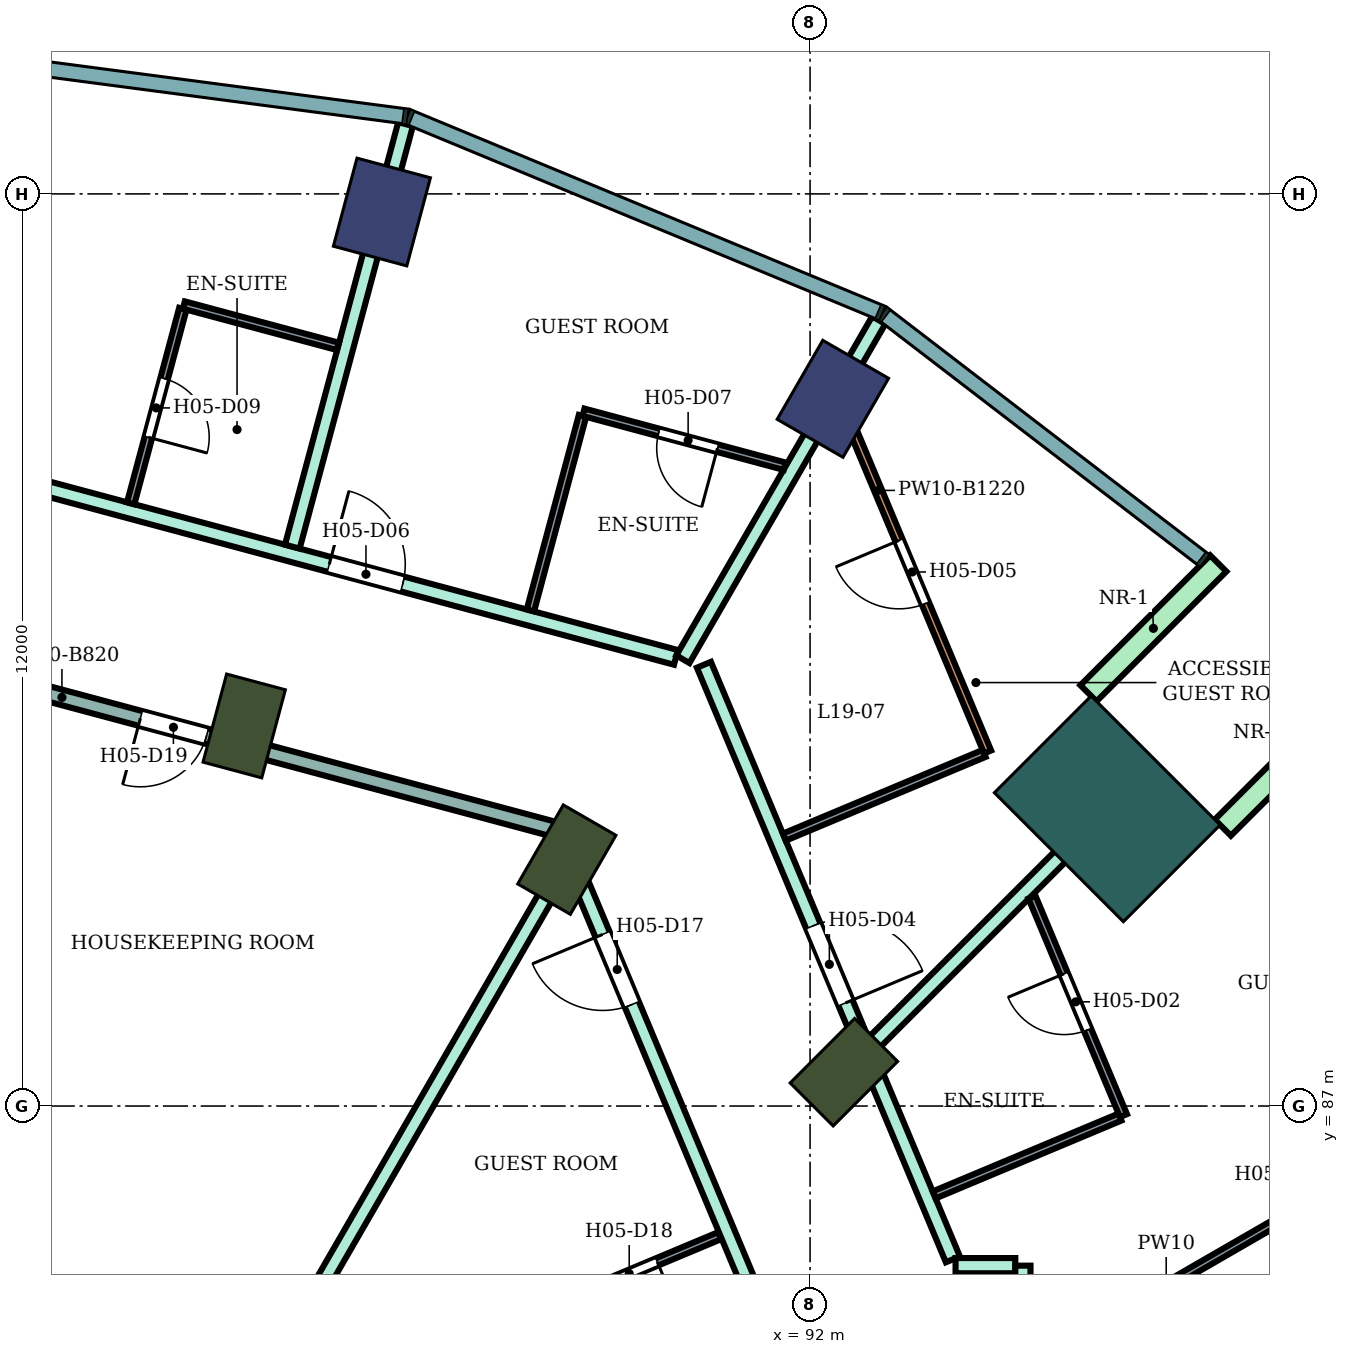
"""IFC4 building model, lengths in metres.
Left out: names, types, materials, properties, quantities, classifications, styles, units other than length and angle.
Written with IfcOpenShell. Run it as: python <this file> out.ifc"""

import sys

from ifc_helpers import new_model, si_unit, direction, frame, frame_2d, origin, origin_2d, place, context, subcontext, project, spatial, rectangle, extrude, element, fill, save


model = new_model("IFC4")
c1 = context("Model", 3, precision=1e-05, world=origin(), true_north=direction((0.0, 1.0)))
c2 = subcontext(c1, "Body", "Model", "MODEL_VIEW")
j1 = project(units=[si_unit("LENGTHUNIT", "METRE"), si_unit("PLANEANGLEUNIT", "RADIAN")], contexts=[c1])
p1 = place(None, origin())
s1 = spatial("IfcSite", under=j1, at=p1, CompositionType="ELEMENT")
p2 = place(p1, origin())
s2 = spatial("IfcBuilding", under=s1, at=p2, CompositionType="ELEMENT")
p3 = place(p2, frame((0.0, 0.0, 86.2)))
s3 = spatial("IfcBuildingStorey", under=s2, at=p3, CompositionType="ELEMENT", Elevation=86.2)
for number, where, z_axis, x_axis in (
    (1, (92.3, 96.304, 0.0), (0.0, 0.0, 1.0), (0.5, 0.866, 0.0)),
    (2, (86.367, 98.762, 0.0), (0.0, 0.0, 1.0), (0.259, 0.966, 0.0)),
):
    element("IfcColumn", number, at=place(p3, frame(where, z_axis=z_axis, x_axis=x_axis)), inside=s3, PredefinedType="COLUMN", context=c2, shape_type="SweptSolid", body=[
        extrude(rectangle(XDim=1.2, YDim=1.0, at=origin_2d()), origin(), (0.0, 0.0, 1.0), 3.8),
    ])
for number, where, z_axis, x_axis in (
    (3, (92.445, 87.445, 0.0), (0.0, 0.0, 1.0), (0.707, 0.707, 0.0)),
    (4, (88.8, 90.242, 0.0), (0.0, 0.0, 1.0), (0.5, 0.866, 0.0)),
    (5, (84.555, 92.0, 0.0), (0.0, 0.0, 1.0), (0.259, 0.966, 0.0)),
):
    element("IfcColumn", number, at=place(p3, frame(where, z_axis=z_axis, x_axis=x_axis)), inside=s3, PredefinedType="COLUMN", context=c2, shape_type="SweptSolid", body=[
        extrude(rectangle(XDim=1.2, YDim=0.8, at=origin_2d()), origin(), (0.0, 0.0, 1.0), 3.8),
    ])
p4 = place(p3, frame((95.91, 90.91, 0.0), z_axis=(0.0, 0.0, 1.0), x_axis=(0.707106781187, 0.707106781187, 0.0)))
e6 = element("IfcColumn", 6, at=p4, inside=s3, PredefinedType="COLUMN", context=c2, shape_type="SweptSolid", body=[
    extrude(rectangle(XDim=1.8, YDim=2.4, at=origin_2d()), origin(), (0.0, 0.0, 1.0), 3.8),
])
for number, where, z_axis, x_axis in (
    (7, (97.43, 90.662, 0.0), (0.0, 0.0, 1.0), (0.707, 0.707, 0.0)),
    (8, (95.662, 92.43, 0.0), (0.0, 0.0, 1.0), (0.707, 0.707, 0.0)),
):
    element("IfcWall", number, at=place(p3, frame(where, z_axis=z_axis, x_axis=x_axis)), inside=s3, PredefinedType="NOTDEFINED", context=c2, shape_type="SweptSolid", body=[
        extrude(rectangle(XDim=2.416, YDim=0.3, at=frame_2d((1.208, 0.0))), origin(), (0.0, 0.0, 1.0), 3.8),
    ])
p5 = place(p3, frame((80.0, 92.954, 0.0), z_axis=(0.0, 0.0, 1.0), x_axis=(0.965932194462, -0.258795277586, 0.0)))
e9 = element("IfcWall", 9, at=p5, inside=s3, PredefinedType="PARTITIONING", context=c2, shape_type="SweptSolid", body=[
    extrude(rectangle(XDim=8.934, YDim=0.2, at=frame_2d((4.467, 0.0))), origin(), (0.0, 0.0, 1.0), 2.98),
])
p6 = place(p5, frame((3.302, 0.0, 0.0)))
e10 = element("IfcOpeningElement", 10, at=p6, cuts=e9, PredefinedType="OPENING", context=c2, shape_type="SweptSolid", body=[
    extrude(rectangle(XDim=0.9, YDim=2.1, at=frame_2d((0.45, 1.05))), frame((0.0, 0.11, 0.0), z_axis=(0.0, -1.0, 0.0), x_axis=(1.0, 0.0, 0.0)), (0.0, 0.0, 1.0), 0.22),
])
p7 = place(p3, frame((80.0, 95.648, 0.0), z_axis=(0.0, 0.0, 1.0), x_axis=(0.965852259202, -0.259093445292, 0.0)))
e11 = element("IfcWall", 11, at=p7, inside=s3, PredefinedType="PARTITIONING", context=c2, shape_type="SweptSolid", body=[
    extrude(rectangle(XDim=10.597, YDim=0.2, at=frame_2d((5.298, 0.0))), origin(), (0.0, 0.0, 1.0), 3.35),
])
p8 = place(p7, frame((5.875, 0.0, 0.0)))
e12 = element("IfcOpeningElement", 12, at=p8, cuts=e11, PredefinedType="OPENING", context=c2, shape_type="SweptSolid", body=[
    extrude(rectangle(XDim=1.0, YDim=2.1, at=frame_2d((0.5, 1.05))), frame((0.0, 0.11, 0.0), z_axis=(0.0, -1.0, 0.0), x_axis=(1.0, 0.0, 0.0)), (0.0, 0.0, 1.0), 0.22),
])
p9 = place(p3, frame((83.85, 81.667, 0.0), z_axis=(0.0, 0.0, 1.0), x_axis=(0.500222212082, 0.865897071562, 0.0)))
e13 = element("IfcWall", 13, at=p9, inside=s3, PredefinedType="PARTITIONING", context=c2, shape_type="SweptSolid", body=[
    extrude(rectangle(XDim=9.768, YDim=0.2, at=frame_2d((4.884, 0.0))), origin(), (0.0, 0.0, 1.0), 3.35),
])
p10 = place(p3, frame((85.188, 94.36, 0.0), z_axis=(0.0, 0.0, 1.0), x_axis=(0.258882407816, 0.965908846074, 0.0)))
e14 = element("IfcWall", 14, at=p10, inside=s3, PredefinedType="PARTITIONING", context=c2, shape_type="SweptSolid", body=[
    extrude(rectangle(XDim=5.755, YDim=0.2, at=frame_2d((2.877, 0.0))), origin(), (0.0, 0.0, 1.0), 3.35),
])
p11 = place(p3, frame((88.698, 90.624, 0.0), z_axis=(0.0, 0.0, 1.0), x_axis=(0.386027055918, -0.922487459047, 0.0)))
e15 = element("IfcWall", 15, at=p11, inside=s3, PredefinedType="PARTITIONING", context=c2, shape_type="SweptSolid", body=[
    extrude(rectangle(XDim=7.832, YDim=0.2, at=frame_2d((3.916, 0.0))), origin(), (0.0, 0.0, 1.0), 3.35),
])
p12 = place(p11, frame((1.482, 0.0, 0.0)))
e16 = element("IfcOpeningElement", 16, at=p12, cuts=e15, PredefinedType="OPENING", context=c2, shape_type="SweptSolid", body=[
    extrude(rectangle(XDim=1.0, YDim=2.1, at=frame_2d((0.5, 1.05))), frame((0.0, 0.11, 0.0), z_axis=(0.0, -1.0, 0.0), x_axis=(1.0, 0.0, 0.0)), (0.0, 0.0, 1.0), 0.22),
])
p13 = place(p3, frame((90.327, 92.878, 0.0), z_axis=(0.0, 0.0, 1.0), x_axis=(0.50022153717, 0.865897461453, 0.0)))
e17 = element("IfcWall", 17, at=p13, inside=s3, PredefinedType="PARTITIONING", context=c2, shape_type="SweptSolid", body=[
    extrude(rectangle(XDim=5.152, YDim=0.2, at=frame_2d((2.576, 0.0))), origin(), (0.0, 0.0, 1.0), 3.35),
])
p14 = place(p3, frame((90.604, 92.805, 0.0), z_axis=(0.0, 0.0, 1.0), x_axis=(0.386209298583, -0.922411176042, 0.0)))
e18 = element("IfcWall", 18, at=p14, inside=s3, PredefinedType="PARTITIONING", context=c2, shape_type="SweptSolid", body=[
    extrude(rectangle(XDim=8.48, YDim=0.2, at=frame_2d((4.24, 0.0))), origin(), (0.0, 0.0, 1.0), 3.35),
])
p15 = place(p14, frame((3.723, 0.0, 0.0)))
e19 = element("IfcOpeningElement", 19, at=p15, cuts=e18, PredefinedType="OPENING", context=c2, shape_type="SweptSolid", body=[
    extrude(rectangle(XDim=1.1, YDim=2.1, at=frame_2d((0.55, 1.05))), frame((0.0, 0.11, 0.0), z_axis=(0.0, -1.0, 0.0), x_axis=(1.0, 0.0, 0.0)), (0.0, 0.0, 1.0), 0.22),
])
p16 = place(p3, frame((92.832, 87.824, 0.0), z_axis=(0.0, 0.0, 1.0), x_axis=(0.707251566381, 0.70696196634, 0.0)))
e20 = element("IfcWall", 20, at=p16, inside=s3, PredefinedType="PARTITIONING", context=c2, shape_type="SweptSolid", body=[
    extrude(rectangle(XDim=5.058, YDim=0.2, at=frame_2d((2.529, 0.0))), origin(), (0.0, 0.0, 1.0), 3.35),
])
p17 = place(p3, frame((93.914, 84.9, 0.0), z_axis=(0.0, 0.0, 1.0), x_axis=(1.0, 0.0, 0.0)))
e21 = element("IfcWall", 21, at=p17, inside=s3, PredefinedType="PARTITIONING", context=c2, shape_type="SweptSolid", body=[
    extrude(rectangle(XDim=0.786, YDim=0.2, at=frame_2d((0.393, 0.0))), origin(), (0.0, 0.0, 1.0), 3.35),
])
p18 = place(p3, frame((94.8, 83.65, 0.0), z_axis=(0.0, 0.0, 1.0), x_axis=(0.0, 1.0, 0.0)))
e22 = element("IfcWall", 22, at=p18, inside=s3, PredefinedType="PARTITIONING", context=c2, shape_type="SweptSolid", body=[
    extrude(rectangle(XDim=1.25, YDim=0.2, at=frame_2d((0.625, 0.0))), origin(), (0.0, 0.0, 1.0), 3.35),
])
p19 = place(p18, frame((0.062, 0.0, 0.0)))
e23 = element("IfcOpeningElement", 23, at=p19, cuts=e22, PredefinedType="OPENING", context=c2, shape_type="SweptSolid", body=[
    extrude(rectangle(XDim=1.0, YDim=2.1, at=frame_2d((0.5, 1.05))), frame((0.0, 0.11, 0.0), z_axis=(0.0, -1.0, 0.0), x_axis=(1.0, 0.0, 0.0)), (0.0, 0.0, 1.0), 0.22),
])
p20 = place(p3, frame((83.062, 94.929, 0.0), z_axis=(0.0, 0.0, 1.0), x_axis=(0.258889588814, 0.965906921398, 0.0)))
e24 = element("IfcWall", 24, at=p20, inside=s3, PredefinedType="PARTITIONING", context=c2, shape_type="SweptSolid", body=[
    extrude(rectangle(XDim=2.65, YDim=0.1, at=frame_2d((1.325, 0.0))), origin(), (0.0, 0.0, 1.0), 3.35),
])
p21 = place(p20, frame((0.9, 0.0, 0.0)))
e25 = element("IfcOpeningElement", 25, at=p21, cuts=e24, PredefinedType="OPENING", context=c2, shape_type="SweptSolid", body=[
    extrude(rectangle(XDim=0.8, YDim=2.1, at=frame_2d((0.4, 1.05))), frame((0.0, 0.06, 0.0), z_axis=(0.0, -1.0, 0.0), x_axis=(1.0, 0.0, 0.0)), (0.0, 0.0, 1.0), 0.12),
])
p22 = place(p3, frame((83.761, 97.538, 0.0), z_axis=(0.0, 0.0, 1.0), x_axis=(0.965871218513, -0.259022758166, 0.0)))
e26 = element("IfcWall", 26, at=p22, inside=s3, PredefinedType="PARTITIONING", context=c2, shape_type="SweptSolid", body=[
    extrude(rectangle(XDim=2.1, YDim=0.1, at=frame_2d((1.05, 0.0))), origin(), (0.0, 0.0, 1.0), 3.35),
])
p23 = place(p3, frame((88.321, 93.521, 0.0), z_axis=(0.0, 0.0, 1.0), x_axis=(0.258677737588, 0.965963678446, 0.0)))
e27 = element("IfcWall", 27, at=p23, inside=s3, PredefinedType="PARTITIONING", context=c2, shape_type="SweptSolid", body=[
    extrude(rectangle(XDim=2.649, YDim=0.1, at=frame_2d((1.325, 0.0))), origin(), (0.0, 0.0, 1.0), 3.35),
])
p24 = place(p3, frame((88.329, 84.255, 0.0), z_axis=(0.0, 0.0, 1.0), x_axis=(0.922320663728, 0.386425404522, 0.0)))
e28 = element("IfcWall", 28, at=p24, inside=s3, PredefinedType="PARTITIONING", context=c2, shape_type="SweptSolid", body=[
    extrude(rectangle(XDim=2.69, YDim=0.1, at=frame_2d((1.345, 0.0))), origin(), (0.0, 0.0, 1.0), 3.35),
])
p25 = place(p24, frame((1.0, 0.0, 0.0)))
e29 = element("IfcOpeningElement", 29, at=p25, cuts=e28, PredefinedType="OPENING", context=c2, shape_type="SweptSolid", body=[
    extrude(rectangle(XDim=0.8, YDim=2.1, at=frame_2d((0.4, 1.05))), frame((0.0, 0.06, 0.0), z_axis=(0.0, -1.0, 0.0), x_axis=(1.0, 0.0, 0.0)), (0.0, 0.0, 1.0), 0.12),
])
p26 = place(p3, frame((89.019, 96.127, 0.0), z_axis=(0.0, 0.0, 1.0), x_axis=(0.965839030583, -0.259142754101, 0.0)))
e30 = element("IfcWall", 30, at=p26, inside=s3, PredefinedType="PARTITIONING", context=c2, shape_type="SweptSolid", body=[
    extrude(rectangle(XDim=2.74, YDim=0.1, at=frame_2d((1.37, 0.0))), origin(), (0.0, 0.0, 1.0), 3.35),
])
p27 = place(p26, frame((1.026, 0.0, 0.0)))
e31 = element("IfcOpeningElement", 31, at=p27, cuts=e30, PredefinedType="OPENING", context=c2, shape_type="SweptSolid", body=[
    extrude(rectangle(XDim=0.8, YDim=2.1, at=frame_2d((0.4, 1.05))), frame((0.0, 0.06, 0.0), z_axis=(0.0, -1.0, 0.0), x_axis=(1.0, 0.0, 0.0)), (0.0, 0.0, 1.0), 0.12),
])
p28 = place(p3, frame((91.661, 90.538, 0.0), z_axis=(0.0, 0.0, 1.0), x_axis=(0.922352973625, 0.386348278169, 0.0)))
e32 = element("IfcWall", 32, at=p28, inside=s3, PredefinedType="PARTITIONING", context=c2, shape_type="SweptSolid", body=[
    extrude(rectangle(XDim=2.85, YDim=0.1, at=frame_2d((1.425, 0.0))), origin(), (0.0, 0.0, 1.0), 3.35),
])
p29 = place(p3, frame((92.414, 96.246, 0.0), z_axis=(0.0, 0.0, 1.0), x_axis=(0.386353683992, -0.922350709256, 0.0)))
e33 = element("IfcWall", 33, at=p29, inside=s3, PredefinedType="PARTITIONING", context=c2, shape_type="SweptSolid", body=[
    extrude(rectangle(XDim=4.974, YDim=0.1, at=frame_2d((2.487, 0.0))), origin(), (0.0, 0.0, 1.0), 2.58),
])
p30 = place(p29, frame((1.957, 0.0, 0.0)))
e34 = element("IfcOpeningElement", 34, at=p30, cuts=e33, PredefinedType="OPENING", context=c2, shape_type="SweptSolid", body=[
    extrude(rectangle(XDim=0.9, YDim=2.1, at=frame_2d((0.45, 1.05))), frame((0.0, 0.06, 0.0), z_axis=(0.0, -1.0, 0.0), x_axis=(1.0, 0.0, 0.0)), (0.0, 0.0, 1.0), 0.12),
])
p31 = place(p3, frame((93.633, 85.831, 0.0), z_axis=(0.0, 0.0, 1.0), x_axis=(0.922344808264, 0.38636777126, 0.0)))
e35 = element("IfcWall", 35, at=p31, inside=s3, PredefinedType="PARTITIONING", context=c2, shape_type="SweptSolid", body=[
    extrude(rectangle(XDim=2.65, YDim=0.1, at=frame_2d((1.325, 0.0))), origin(), (0.0, 0.0, 1.0), 3.35),
])
p32 = place(p3, frame((94.8, 83.545, 0.0), z_axis=(0.0, 0.0, 1.0), x_axis=(0.86602264145, 0.500004784474, 0.0)))
e36 = element("IfcWall", 36, at=p32, inside=s3, PredefinedType="PARTITIONING", context=c2, shape_type="SweptSolid", body=[
    extrude(rectangle(XDim=8.708, YDim=0.1, at=frame_2d((4.354, 0.0))), origin(), (0.0, 0.0, 1.0), 3.35),
])
p33 = place(p32, frame((3.879, 0.0, 0.0)))
e37 = element("IfcOpeningElement", 37, at=p33, cuts=e36, PredefinedType="OPENING", context=c2, shape_type="SweptSolid", body=[
    extrude(rectangle(XDim=0.9, YDim=2.1, at=frame_2d((0.45, 1.05))), frame((0.0, 0.06, 0.0), z_axis=(0.0, -1.0, 0.0), x_axis=(1.0, 0.0, 0.0)), (0.0, 0.0, 1.0), 0.12),
])
p34 = place(p3, frame((94.919, 89.748, 0.0), z_axis=(0.0, 0.0, 1.0), x_axis=(0.38635048828, -0.922352047868, 0.0)))
e38 = element("IfcWall", 38, at=p34, inside=s3, PredefinedType="PARTITIONING", context=c2, shape_type="SweptSolid", body=[
    extrude(rectangle(XDim=3.116, YDim=0.1, at=frame_2d((1.558, 0.0))), origin(), (0.0, 0.0, 1.0), 3.35),
])
p35 = place(p34, frame((1.093, 0.0, 0.0)))
e39 = element("IfcOpeningElement", 39, at=p35, cuts=e38, PredefinedType="OPENING", context=c2, shape_type="SweptSolid", body=[
    extrude(rectangle(XDim=0.8, YDim=2.1, at=frame_2d((0.4, 1.05))), frame((0.0, 0.06, 0.0), z_axis=(0.0, -1.0, 0.0), x_axis=(1.0, 0.0, 0.0)), (0.0, 0.0, 1.0), 0.12),
])
p36 = place(p35, frame((0.8, 0.0, 0.0), z_axis=(0.0, 0.0, 1.0), x_axis=(-1.0, 0.0, 0.0)))
e40 = element("IfcDoor", 40, at=p36, inside=s3, OperationType="SINGLE_SWING_RIGHT", PredefinedType="DOOR", context=c2, shape_type="SweptSolid", body=[
    extrude(rectangle(XDim=0.8, YDim=2.1, at=frame_2d((0.4, 1.05))), frame((0.0, 0.025, 0.0), z_axis=(0.0, -1.0, 0.0), x_axis=(1.0, 0.0, 0.0)), (0.0, 0.0, 1.0), 0.05),
])
fill(e39, e40)
p37 = place(p15, origin())
e41 = element("IfcDoor", 41, at=p37, inside=s3, OperationType="SINGLE_SWING_RIGHT", PredefinedType="DOOR", context=c2, shape_type="SweptSolid", body=[
    extrude(rectangle(XDim=1.1, YDim=2.1, at=frame_2d((0.55, 1.05))), frame((0.0, 0.025, 0.0), z_axis=(0.0, -1.0, 0.0), x_axis=(1.0, 0.0, 0.0)), (0.0, 0.0, 1.0), 0.05),
])
fill(e19, e41)
p38 = place(p30, frame((0.9, 0.0, 0.0), z_axis=(0.0, 0.0, 1.0), x_axis=(-1.0, 0.0, 0.0)))
e42 = element("IfcDoor", 42, at=p38, inside=s3, OperationType="SINGLE_SWING_RIGHT", PredefinedType="DOOR", context=c2, shape_type="SweptSolid", body=[
    extrude(rectangle(XDim=0.9, YDim=2.1, at=frame_2d((0.45, 1.05))), frame((0.0, 0.025, 0.0), z_axis=(0.0, -1.0, 0.0), x_axis=(1.0, 0.0, 0.0)), (0.0, 0.0, 1.0), 0.05),
])
fill(e34, e42)
p39 = place(p8, origin())
e43 = element("IfcDoor", 43, at=p39, inside=s3, OperationType="SINGLE_SWING_LEFT", PredefinedType="DOOR", context=c2, shape_type="SweptSolid", body=[
    extrude(rectangle(XDim=1.0, YDim=2.1, at=frame_2d((0.5, 1.05))), frame((0.0, 0.025, 0.0), z_axis=(0.0, -1.0, 0.0), x_axis=(1.0, 0.0, 0.0)), (0.0, 0.0, 1.0), 0.05),
])
fill(e12, e43)
p40 = place(p27, frame((0.8, 0.0, 0.0), z_axis=(0.0, 0.0, 1.0), x_axis=(-1.0, 0.0, 0.0)))
e44 = element("IfcDoor", 44, at=p40, inside=s3, OperationType="SINGLE_SWING_LEFT", PredefinedType="DOOR", context=c2, shape_type="SweptSolid", body=[
    extrude(rectangle(XDim=0.8, YDim=2.1, at=frame_2d((0.4, 1.05))), frame((0.0, 0.025, 0.0), z_axis=(0.0, -1.0, 0.0), x_axis=(1.0, 0.0, 0.0)), (0.0, 0.0, 1.0), 0.05),
])
fill(e31, e44)
p41 = place(p21, frame((0.8, 0.0, 0.0), z_axis=(0.0, 0.0, 1.0), x_axis=(-1.0, 0.0, 0.0)))
e45 = element("IfcDoor", 45, at=p41, inside=s3, OperationType="SINGLE_SWING_RIGHT", PredefinedType="DOOR", context=c2, shape_type="SweptSolid", body=[
    extrude(rectangle(XDim=0.8, YDim=2.1, at=frame_2d((0.4, 1.05))), frame((0.0, 0.025, 0.0), z_axis=(0.0, -1.0, 0.0), x_axis=(1.0, 0.0, 0.0)), (0.0, 0.0, 1.0), 0.05),
])
fill(e25, e45)
p42 = place(p12, frame((1.0, 0.0, 0.0), z_axis=(0.0, 0.0, 1.0), x_axis=(-1.0, 0.0, 0.0)))
e46 = element("IfcDoor", 46, at=p42, inside=s3, OperationType="SINGLE_SWING_RIGHT", PredefinedType="DOOR", context=c2, shape_type="SweptSolid", body=[
    extrude(rectangle(XDim=1.0, YDim=2.1, at=frame_2d((0.5, 1.05))), frame((0.0, 0.025, 0.0), z_axis=(0.0, -1.0, 0.0), x_axis=(1.0, 0.0, 0.0)), (0.0, 0.0, 1.0), 0.05),
])
fill(e16, e46)
p43 = place(p25, frame((0.8, 0.0, 0.0), z_axis=(0.0, 0.0, 1.0), x_axis=(-1.0, 0.0, 0.0)))
e47 = element("IfcDoor", 47, at=p43, inside=s3, OperationType="SINGLE_SWING_LEFT", PredefinedType="DOOR", context=c2, shape_type="SweptSolid", body=[
    extrude(rectangle(XDim=0.8, YDim=2.1, at=frame_2d((0.4, 1.05))), frame((0.0, 0.025, 0.0), z_axis=(0.0, -1.0, 0.0), x_axis=(1.0, 0.0, 0.0)), (0.0, 0.0, 1.0), 0.05),
])
fill(e29, e47)
p44 = place(p6, frame((0.9, 0.0, 0.0), z_axis=(0.0, 0.0, 1.0), x_axis=(-1.0, 0.0, 0.0)))
e48 = element("IfcDoor", 48, at=p44, inside=s3, OperationType="SINGLE_SWING_RIGHT", PredefinedType="DOOR", context=c2, shape_type="SweptSolid", body=[
    extrude(rectangle(XDim=0.9, YDim=2.1, at=frame_2d((0.45, 1.05))), frame((0.0, 0.025, 0.0), z_axis=(0.0, -1.0, 0.0), x_axis=(1.0, 0.0, 0.0)), (0.0, 0.0, 1.0), 0.05),
])
fill(e10, e48)
save(model, sys.argv[1])
